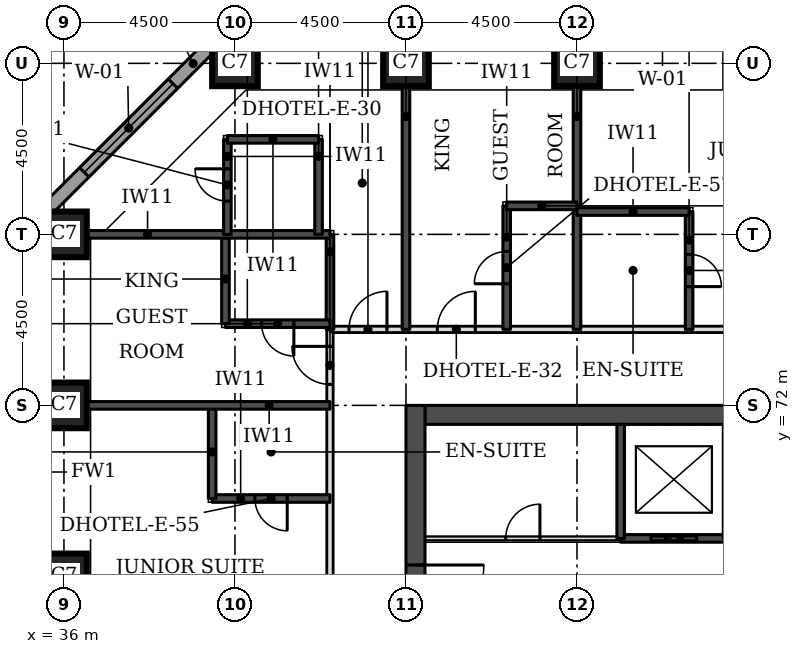
"""IFC4 building model, lengths in metres.
Left out: names, types, materials, properties, quantities, classifications, styles, units other than length and angle.
Written with IfcOpenShell. Run it as: python <this file> out.ifc"""

import sys

from ifc_helpers import new_model, si_unit, direction, frame, frame_2d, origin, origin_2d, place, context, subcontext, project, spatial, rectangle, extrude, element, fill, save


model = new_model("IFC4")
c1 = context("Model", 3, precision=1e-05, world=origin(), true_north=direction((0.0, 1.0)))
c2 = subcontext(c1, "Body", "Model", "MODEL_VIEW")
j1 = project(units=[si_unit("LENGTHUNIT", "METRE"), si_unit("PLANEANGLEUNIT", "RADIAN")], contexts=[c1])
p1 = place(None, origin())
s1 = spatial("IfcSite", under=j1, at=p1, CompositionType="ELEMENT")
p2 = place(p1, origin())
s2 = spatial("IfcBuilding", under=s1, at=p2, CompositionType="ELEMENT")
p3 = place(p2, frame((0.0, 0.0, 62.7)))
s3 = spatial("IfcBuildingStorey", under=s2, at=p3, CompositionType="ELEMENT", Elevation=62.7)
for number, where, z_axis, x_axis in (
    (1, (36.0, 67.5, 0.0), (0.0, 0.0, 1.0), (1.0, 0.0, 0.0)),
    (2, (36.0, 72.0, 0.0), (0.0, 0.0, 1.0), (1.0, 0.0, 0.0)),
    (3, (36.0, 76.5, 0.0), (0.0, 0.0, 1.0), (1.0, 0.0, 0.0)),
    (4, (40.5, 81.0, 0.0), (0.0, 0.0, 1.0), (1.0, 0.0, 0.0)),
    (5, (45.0, 81.0, 0.0), (0.0, 0.0, 1.0), (1.0, 0.0, 0.0)),
    (6, (49.5, 81.0, 0.0), (0.0, 0.0, 1.0), (1.0, 0.0, 0.0)),
):
    element("IfcColumn", number, at=place(p3, frame(where, z_axis=z_axis, x_axis=x_axis)), inside=s3, PredefinedType="COLUMN", context=c2, shape_type="SweptSolid", body=[
        extrude(rectangle(XDim=1.2, YDim=1.2, at=origin_2d()), origin(), (0.0, 0.0, 1.0), 3.3),
    ])
p4 = place(p3, frame((45.5, 71.75, 0.0), z_axis=(0.0, 0.0, 1.0), x_axis=(1.0, 0.0, 0.0)))
e7 = element("IfcWall", 7, at=p4, inside=s3, PredefinedType="SHEAR", context=c2, shape_type="SweptSolid", body=[
    extrude(rectangle(XDim=21.5, YDim=0.5, at=frame_2d((10.75, 0.0))), origin(), (0.0, 0.0, 1.0), 3.3),
])
p5 = place(p3, frame((45.25, 49.5, 0.0), z_axis=(0.0, 0.0, 1.0), x_axis=(0.0, 1.0, 0.0)))
e8 = element("IfcWall", 8, at=p5, inside=s3, PredefinedType="SHEAR", context=c2, shape_type="SweptSolid", body=[
    extrude(rectangle(XDim=22.5, YDim=0.5, at=frame_2d((11.25, 0.0))), origin(), (0.0, 0.0, 1.0), 3.3),
])
p6 = place(p5, frame((4.2, 0.0, 0.0)))
e9 = element("IfcOpeningElement", 9, at=p6, cuts=e8, PredefinedType="OPENING", context=c2, shape_type="SweptSolid", body=[
    extrude(rectangle(XDim=1.8, YDim=2.1, at=frame_2d((0.9, 1.05))), frame((0.0, 0.26, 0.0), z_axis=(0.0, -1.0, 0.0), x_axis=(1.0, 0.0, 0.0)), (0.0, 0.0, 1.0), 0.52),
])
p7 = place(p5, frame((6.9, 0.0, 0.0)))
e10 = element("IfcOpeningElement", 10, at=p7, cuts=e8, PredefinedType="OPENING", context=c2, shape_type="SweptSolid", body=[
    extrude(rectangle(XDim=1.1, YDim=2.1, at=frame_2d((0.55, 1.05))), frame((0.0, 0.26, 0.0), z_axis=(0.0, -1.0, 0.0), x_axis=(1.0, 0.0, 0.0)), (0.0, 0.0, 1.0), 0.52),
])
p8 = place(p5, frame((13.6, 0.0, 0.0)))
e11 = element("IfcOpeningElement", 11, at=p8, cuts=e8, PredefinedType="OPENING", context=c2, shape_type="SweptSolid", body=[
    extrude(rectangle(XDim=1.1, YDim=2.1, at=frame_2d((0.55, 1.05))), frame((0.0, 0.26, 0.0), z_axis=(0.0, -1.0, 0.0), x_axis=(1.0, 0.0, 0.0)), (0.0, 0.0, 1.0), 0.52),
])
p9 = place(p5, frame((16.5, 0.0, 0.0)))
e12 = element("IfcOpeningElement", 12, at=p9, cuts=e8, PredefinedType="OPENING", context=c2, shape_type="SweptSolid", body=[
    extrude(rectangle(XDim=1.8, YDim=2.1, at=frame_2d((0.9, 1.05))), frame((0.0, 0.26, 0.0), z_axis=(0.0, -1.0, 0.0), x_axis=(1.0, 0.0, 0.0)), (0.0, 0.0, 1.0), 0.52),
])
p10 = place(p3, frame((40.23, 81.826, 0.0), z_axis=(0.0, 0.0, 1.0), x_axis=(-0.707106781187, -0.707106781187, 0.0)))
e13 = element("IfcWall", 13, at=p10, inside=s3, PredefinedType="STANDARD", context=c2, shape_type="SweptSolid", body=[
    extrude(rectangle(XDim=7.151, YDim=0.35, at=frame_2d((3.576, 0.0))), origin(), (0.0, 0.0, 1.0), 3.055),
])
p11 = place(p10, frame((1.926, 0.0, 0.8)))
e14 = element("IfcOpeningElement", 14, at=p11, cuts=e13, PredefinedType="OPENING", context=c2, shape_type="SweptSolid", body=[
    extrude(rectangle(XDim=3.3, YDim=1.5, at=frame_2d((1.65, 0.75))), frame((0.0, 0.185, 0.0), z_axis=(0.0, -1.0, 0.0), x_axis=(1.0, 0.0, 0.0)), (0.0, 0.0, 1.0), 0.37),
])
p12 = place(p3, frame((43.0, 57.35, 0.0), z_axis=(0.0, 0.0, 1.0), x_axis=(0.0, 1.0, 0.0)))
e15 = element("IfcWall", 15, at=p12, inside=s3, PredefinedType="PARTITIONING", context=c2, shape_type="SweptSolid", body=[
    extrude(rectangle(XDim=16.65, YDim=0.15, at=frame_2d((8.325, 0.0))), origin(), (0.0, 0.0, 1.0), 3.08),
])
p13 = place(p12, frame((8.425, 0.0, 0.0)))
e16 = element("IfcOpeningElement", 16, at=p13, cuts=e15, PredefinedType="OPENING", context=c2, shape_type="SweptSolid", body=[
    extrude(rectangle(XDim=1.0, YDim=2.1, at=frame_2d((0.5, 1.05))), frame((0.0, 0.085, 0.0), z_axis=(0.0, -1.0, 0.0), x_axis=(1.0, 0.0, 0.0)), (0.0, 0.0, 1.0), 0.17),
])
p14 = place(p12, frame((15.203, 0.0, 0.0)))
e17 = element("IfcOpeningElement", 17, at=p14, cuts=e15, PredefinedType="OPENING", context=c2, shape_type="SweptSolid", body=[
    extrude(rectangle(XDim=1.0, YDim=2.1, at=frame_2d((0.5, 1.05))), frame((0.0, 0.085, 0.0), z_axis=(0.0, -1.0, 0.0), x_axis=(1.0, 0.0, 0.0)), (0.0, 0.0, 1.0), 0.17),
])
p15 = place(p3, frame((43.0, 74.0, 0.0), z_axis=(0.0, 0.0, 1.0), x_axis=(1.0, 0.0, 0.0)))
e18 = element("IfcWall", 18, at=p15, inside=s3, PredefinedType="PARTITIONING", context=c2, shape_type="SweptSolid", body=[
    extrude(rectangle(XDim=26.5, YDim=0.15, at=frame_2d((13.25, 0.0))), origin(), (0.0, 0.0, 1.0), 3.08),
])
p16 = place(p15, frame((2.825, 0.0, 0.0)))
e19 = element("IfcOpeningElement", 19, at=p16, cuts=e18, PredefinedType="OPENING", context=c2, shape_type="SweptSolid", body=[
    extrude(rectangle(XDim=1.0, YDim=2.1, at=frame_2d((0.5, 1.05))), frame((0.0, 0.085, 0.0), z_axis=(0.0, -1.0, 0.0), x_axis=(1.0, 0.0, 0.0)), (0.0, 0.0, 1.0), 0.17),
])
p17 = place(p15, frame((11.975, 0.0, 0.0)))
e20 = element("IfcOpeningElement", 20, at=p17, cuts=e18, PredefinedType="OPENING", context=c2, shape_type="SweptSolid", body=[
    extrude(rectangle(XDim=1.0, YDim=2.1, at=frame_2d((0.5, 1.05))), frame((0.0, 0.085, 0.0), z_axis=(0.0, -1.0, 0.0), x_axis=(1.0, 0.0, 0.0)), (0.0, 0.0, 1.0), 0.17),
])
p18 = place(p15, frame((18.275, 0.0, 0.0)))
e21 = element("IfcOpeningElement", 21, at=p18, cuts=e18, PredefinedType="OPENING", context=c2, shape_type="SweptSolid", body=[
    extrude(rectangle(XDim=1.0, YDim=2.1, at=frame_2d((0.5, 1.05))), frame((0.0, 0.085, 0.0), z_axis=(0.0, -1.0, 0.0), x_axis=(1.0, 0.0, 0.0)), (0.0, 0.0, 1.0), 0.17),
])
p19 = place(p15, frame((0.5, 0.0, 0.0)))
e22 = element("IfcOpeningElement", 22, at=p19, cuts=e18, PredefinedType="OPENING", context=c2, shape_type="SweptSolid", body=[
    extrude(rectangle(XDim=1.0, YDim=2.1, at=frame_2d((0.5, 1.05))), frame((0.0, 0.085, 0.0), z_axis=(0.0, -1.0, 0.0), x_axis=(1.0, 0.0, 0.0)), (0.0, 0.0, 1.0), 0.17),
])
p20 = place(p15, frame((25.0, 0.0, 0.0)))
e23 = element("IfcOpeningElement", 23, at=p20, cuts=e18, PredefinedType="OPENING", context=c2, shape_type="SweptSolid", body=[
    extrude(rectangle(XDim=1.0, YDim=2.1, at=frame_2d((0.5, 1.05))), frame((0.0, 0.085, 0.0), z_axis=(0.0, -1.0, 0.0), x_axis=(1.0, 0.0, 0.0)), (0.0, 0.0, 1.0), 0.17),
])
p21 = place(p3, frame((39.9, 69.55, 0.0), z_axis=(0.0, 0.0, 1.0), x_axis=(1.0, 0.0, 0.0)))
e24 = element("IfcWall", 24, at=p21, inside=s3, PredefinedType="SOLIDWALL", context=c2, shape_type="SweptSolid", body=[
    extrude(rectangle(XDim=3.1, YDim=0.2, at=frame_2d((1.55, 0.0))), origin(), (0.0, 0.0, 1.0), 3.08),
])
p22 = place(p21, frame((1.125, 0.0, 0.0)))
e25 = element("IfcOpeningElement", 25, at=p22, cuts=e24, PredefinedType="OPENING", context=c2, shape_type="SweptSolid", body=[
    extrude(rectangle(XDim=0.85, YDim=2.1, at=frame_2d((0.425, 1.05))), frame((0.0, 0.11, 0.0), z_axis=(0.0, -1.0, 0.0), x_axis=(1.0, 0.0, 0.0)), (0.0, 0.0, 1.0), 0.22),
])
p23 = place(p3, frame((39.9, 69.55, 0.0), z_axis=(0.0, 0.0, 1.0), x_axis=(0.0, 1.0, 0.0)))
e26 = element("IfcWall", 26, at=p23, inside=s3, PredefinedType="SOLIDWALL", context=c2, shape_type="SweptSolid", body=[
    extrude(rectangle(XDim=2.45, YDim=0.2, at=frame_2d((1.225, 0.0))), origin(), (0.0, 0.0, 1.0), 3.08),
])
p24 = place(p3, frame((36.6, 72.0, 0.0), z_axis=(0.0, 0.0, 1.0), x_axis=(1.0, 0.0, 0.0)))
e27 = element("IfcWall", 27, at=p24, inside=s3, PredefinedType="SOLIDWALL", context=c2, shape_type="SweptSolid", body=[
    extrude(rectangle(XDim=6.4, YDim=0.2, at=frame_2d((3.2, 0.0))), origin(), (0.0, 0.0, 1.0), 3.08),
])
p25 = place(p3, frame((43.0, 74.0, 0.0), z_axis=(0.0, 0.0, 1.0), x_axis=(0.0, 1.0, 0.0)))
e28 = element("IfcWall", 28, at=p25, inside=s3, PredefinedType="SOLIDWALL", context=c2, shape_type="SweptSolid", body=[
    extrude(rectangle(XDim=2.5, YDim=0.2, at=frame_2d((1.25, 0.0))), origin(), (0.0, 0.0, 1.0), 3.08),
])
p26 = place(p3, frame((45.0, 74.0, 0.0), z_axis=(0.0, 0.0, 1.0), x_axis=(0.0, 1.0, 0.0)))
e29 = element("IfcWall", 29, at=p26, inside=s3, PredefinedType="SOLIDWALL", context=c2, shape_type="SweptSolid", body=[
    extrude(rectangle(XDim=6.4, YDim=0.2, at=frame_2d((3.2, 0.0))), origin(), (0.0, 0.0, 1.0), 3.08),
])
p27 = place(p3, frame((47.65, 74.0, 0.0), z_axis=(0.0, 0.0, 1.0), x_axis=(0.0, 1.0, 0.0)))
e30 = element("IfcWall", 30, at=p27, inside=s3, PredefinedType="SOLIDWALL", context=c2, shape_type="SweptSolid", body=[
    extrude(rectangle(XDim=3.25, YDim=0.2, at=frame_2d((1.625, 0.0))), origin(), (0.0, 0.0, 1.0), 3.08),
])
p28 = place(p27, frame((1.2, 0.0, 0.0)))
e31 = element("IfcOpeningElement", 31, at=p28, cuts=e30, PredefinedType="OPENING", context=c2, shape_type="SweptSolid", body=[
    extrude(rectangle(XDim=0.85, YDim=2.1, at=frame_2d((0.425, 1.05))), frame((0.0, 0.11, 0.0), z_axis=(0.0, -1.0, 0.0), x_axis=(1.0, 0.0, 0.0)), (0.0, 0.0, 1.0), 0.22),
])
p29 = place(p3, frame((49.5, 74.0, 0.0), z_axis=(0.0, 0.0, 1.0), x_axis=(0.0, 1.0, 0.0)))
e32 = element("IfcWall", 32, at=p29, inside=s3, PredefinedType="SOLIDWALL", context=c2, shape_type="SweptSolid", body=[
    extrude(rectangle(XDim=6.4, YDim=0.2, at=frame_2d((3.2, 0.0))), origin(), (0.0, 0.0, 1.0), 3.08),
])
p30 = place(p3, frame((52.45, 74.0, 0.0), z_axis=(0.0, 0.0, 1.0), x_axis=(0.0, 1.0, 0.0)))
e33 = element("IfcWall", 33, at=p30, inside=s3, PredefinedType="SOLIDWALL", context=c2, shape_type="SweptSolid", body=[
    extrude(rectangle(XDim=3.1, YDim=0.2, at=frame_2d((1.55, 0.0))), origin(), (0.0, 0.0, 1.0), 3.08),
])
p31 = place(p30, frame((1.125, 0.0, 0.0)))
e34 = element("IfcOpeningElement", 34, at=p31, cuts=e33, PredefinedType="OPENING", context=c2, shape_type="SweptSolid", body=[
    extrude(rectangle(XDim=0.85, YDim=2.1, at=frame_2d((0.425, 1.05))), frame((0.0, 0.11, 0.0), z_axis=(0.0, -1.0, 0.0), x_axis=(1.0, 0.0, 0.0)), (0.0, 0.0, 1.0), 0.22),
])
p32 = place(p3, frame((40.25, 74.15, 0.0), z_axis=(0.0, 0.0, 1.0), x_axis=(1.0, 0.0, 0.0)))
e35 = element("IfcWall", 35, at=p32, inside=s3, PredefinedType="SOLIDWALL", context=c2, shape_type="SweptSolid", body=[
    extrude(rectangle(XDim=2.75, YDim=0.2, at=frame_2d((1.375, 0.0))), origin(), (0.0, 0.0, 1.0), 3.08),
])
p33 = place(p32, frame((0.95, 0.0, 0.0)))
e36 = element("IfcOpeningElement", 36, at=p33, cuts=e35, PredefinedType="OPENING", context=c2, shape_type="SweptSolid", body=[
    extrude(rectangle(XDim=0.85, YDim=2.1, at=frame_2d((0.425, 1.05))), frame((0.0, 0.11, 0.0), z_axis=(0.0, -1.0, 0.0), x_axis=(1.0, 0.0, 0.0)), (0.0, 0.0, 1.0), 0.22),
])
p34 = place(p3, frame((40.25, 74.15, 0.0), z_axis=(0.0, 0.0, 1.0), x_axis=(0.0, 1.0, 0.0)))
e37 = element("IfcWall", 37, at=p34, inside=s3, PredefinedType="SOLIDWALL", context=c2, shape_type="SweptSolid", body=[
    extrude(rectangle(XDim=2.35, YDim=0.2, at=frame_2d((1.175, 0.0))), origin(), (0.0, 0.0, 1.0), 3.08),
])
p35 = place(p3, frame((36.6, 76.5, 0.0), z_axis=(0.0, 0.0, 1.0), x_axis=(1.0, 0.0, 0.0)))
e38 = element("IfcWall", 38, at=p35, inside=s3, PredefinedType="SOLIDWALL", context=c2, shape_type="SweptSolid", body=[
    extrude(rectangle(XDim=6.4, YDim=0.2, at=frame_2d((3.2, 0.0))), origin(), (0.0, 0.0, 1.0), 3.08),
])
p36 = place(p3, frame((40.3, 76.5, 0.0), z_axis=(0.0, 0.0, 1.0), x_axis=(0.0, 1.0, 0.0)))
e39 = element("IfcWall", 39, at=p36, inside=s3, PredefinedType="SOLIDWALL", context=c2, shape_type="SweptSolid", body=[
    extrude(rectangle(XDim=2.5, YDim=0.2, at=frame_2d((1.25, 0.0))), origin(), (0.0, 0.0, 1.0), 3.08),
])
p37 = place(p36, frame((0.875, 0.0, 0.0)))
e40 = element("IfcOpeningElement", 40, at=p37, cuts=e39, PredefinedType="OPENING", context=c2, shape_type="SweptSolid", body=[
    extrude(rectangle(XDim=0.85, YDim=2.1, at=frame_2d((0.425, 1.05))), frame((0.0, 0.11, 0.0), z_axis=(0.0, -1.0, 0.0), x_axis=(1.0, 0.0, 0.0)), (0.0, 0.0, 1.0), 0.22),
])
p38 = place(p3, frame((42.7, 76.5, 0.0), z_axis=(0.0, 0.0, 1.0), x_axis=(0.0, 1.0, 0.0)))
e41 = element("IfcWall", 41, at=p38, inside=s3, PredefinedType="SOLIDWALL", context=c2, shape_type="SweptSolid", body=[
    extrude(rectangle(XDim=2.5, YDim=0.2, at=frame_2d((1.25, 0.0))), origin(), (0.0, 0.0, 1.0), 3.08),
])
p39 = place(p3, frame((49.5, 77.1, 0.0), z_axis=(0.0, 0.0, 1.0), x_axis=(1.0, 0.0, 0.0)))
e42 = element("IfcWall", 42, at=p39, inside=s3, PredefinedType="SOLIDWALL", context=c2, shape_type="SweptSolid", body=[
    extrude(rectangle(XDim=2.95, YDim=0.2, at=frame_2d((1.475, 0.0))), origin(), (0.0, 0.0, 1.0), 3.08),
])
p40 = place(p3, frame((47.65, 77.25, 0.0), z_axis=(0.0, 0.0, 1.0), x_axis=(1.0, 0.0, 0.0)))
e43 = element("IfcWall", 43, at=p40, inside=s3, PredefinedType="SOLIDWALL", context=c2, shape_type="SweptSolid", body=[
    extrude(rectangle(XDim=1.85, YDim=0.2, at=frame_2d((0.925, 0.0))), origin(), (0.0, 0.0, 1.0), 3.08),
])
p41 = place(p3, frame((40.3, 79.0, 0.0), z_axis=(0.0, 0.0, 1.0), x_axis=(1.0, 0.0, 0.0)))
e44 = element("IfcWall", 44, at=p41, inside=s3, PredefinedType="SOLIDWALL", context=c2, shape_type="SweptSolid", body=[
    extrude(rectangle(XDim=2.4, YDim=0.2, at=frame_2d((1.2, 0.0))), origin(), (0.0, 0.0, 1.0), 3.08),
])
p42 = place(p3, frame((45.5, 68.5, 0.0), z_axis=(0.0, 0.0, 1.0), x_axis=(1.0, 0.0, 0.0)))
e45 = element("IfcWall", 45, at=p42, inside=s3, PredefinedType="PARTITIONING", context=c2, shape_type="SweptSolid", body=[
    extrude(rectangle(XDim=5.15, YDim=0.1, at=frame_2d((2.575, 0.0))), origin(), (0.0, 0.0, 1.0), 3.08),
])
p43 = place(p42, frame((2.125, 0.0, 0.0)))
e46 = element("IfcOpeningElement", 46, at=p43, cuts=e45, PredefinedType="OPENING", context=c2, shape_type="SweptSolid", body=[
    extrude(rectangle(XDim=0.9, YDim=2.1, at=frame_2d((0.45, 1.05))), frame((0.0, 0.06, 0.0), z_axis=(0.0, -1.0, 0.0), x_axis=(1.0, 0.0, 0.0)), (0.0, 0.0, 1.0), 0.12),
])
p44 = place(p3, frame((50.65, 68.5, 0.0), z_axis=(0.0, 0.0, 1.0), x_axis=(1.0, 0.0, 0.0)))
e47 = element("IfcWall", 47, at=p44, inside=s3, PredefinedType="SOLIDWALL", context=c2, shape_type="SweptSolid", body=[
    extrude(rectangle(XDim=11.2, YDim=0.2, at=frame_2d((5.6, 0.0))), origin(), (0.0, 0.0, 1.0), 3.08),
])
p45 = place(p44, frame((0.8, 0.0, 0.0)))
e48 = element("IfcOpeningElement", 48, at=p45, cuts=e47, PredefinedType="OPENING", context=c2, shape_type="SweptSolid", body=[
    extrude(rectangle(XDim=1.2, YDim=2.1, at=frame_2d((0.6, 1.05))), frame((0.0, 0.11, 0.0), z_axis=(0.0, -1.0, 0.0), x_axis=(1.0, 0.0, 0.0)), (0.0, 0.0, 1.0), 0.22),
])
p46 = place(p44, frame((3.6, 0.0, 0.0)))
e49 = element("IfcOpeningElement", 49, at=p46, cuts=e47, PredefinedType="OPENING", context=c2, shape_type="SweptSolid", body=[
    extrude(rectangle(XDim=1.2, YDim=2.1, at=frame_2d((0.6, 1.05))), frame((0.0, 0.11, 0.0), z_axis=(0.0, -1.0, 0.0), x_axis=(1.0, 0.0, 0.0)), (0.0, 0.0, 1.0), 0.22),
])
p47 = place(p44, frame((6.4, 0.0, 0.0)))
e50 = element("IfcOpeningElement", 50, at=p47, cuts=e47, PredefinedType="OPENING", context=c2, shape_type="SweptSolid", body=[
    extrude(rectangle(XDim=1.2, YDim=2.1, at=frame_2d((0.6, 1.05))), frame((0.0, 0.11, 0.0), z_axis=(0.0, -1.0, 0.0), x_axis=(1.0, 0.0, 0.0)), (0.0, 0.0, 1.0), 0.22),
])
p48 = place(p44, frame((9.2, 0.0, 0.0)))
e51 = element("IfcOpeningElement", 51, at=p48, cuts=e47, PredefinedType="OPENING", context=c2, shape_type="SweptSolid", body=[
    extrude(rectangle(XDim=1.2, YDim=2.1, at=frame_2d((0.6, 1.05))), frame((0.0, 0.11, 0.0), z_axis=(0.0, -1.0, 0.0), x_axis=(1.0, 0.0, 0.0)), (0.0, 0.0, 1.0), 0.22),
])
for number, where, z_axis, x_axis in (
    (52, (50.65, 68.5, 0.0), (0.0, 0.0, 1.0), (0.0, 1.0, 0.0)),
    (53, (53.45, 68.5, 0.0), (0.0, 0.0, 1.0), (0.0, 1.0, 0.0)),
):
    element("IfcWall", number, at=place(p3, frame(where, z_axis=z_axis, x_axis=x_axis)), inside=s3, PredefinedType="SOLIDWALL", context=c2, shape_type="SweptSolid", body=[
        extrude(rectangle(XDim=3.0, YDim=0.2, at=frame_2d((1.5, 0.0))), origin(), (0.0, 0.0, 1.0), 3.08),
    ])
p49 = place(p11, origin())
e54 = element("IfcWindow", 54, at=p49, inside=s3, PartitioningType="SINGLE_PANEL", PredefinedType="WINDOW", context=c2, shape_type="SweptSolid", body=[
    extrude(rectangle(XDim=3.3, YDim=1.5, at=frame_2d((1.65, 0.75))), frame((0.0, 0.085, 0.0), z_axis=(0.0, -1.0, 0.0), x_axis=(1.0, 0.0, 0.0)), (0.0, 0.0, 1.0), 0.06),
])
fill(e14, e54)
p50 = place(p22, frame((0.85, 0.0, 0.0), z_axis=(0.0, 0.0, 1.0), x_axis=(-1.0, 0.0, 0.0)))
e55 = element("IfcDoor", 55, at=p50, inside=s3, OperationType="SINGLE_SWING_LEFT", PredefinedType="DOOR", context=c2, shape_type="SweptSolid", body=[
    extrude(rectangle(XDim=0.85, YDim=2.1, at=frame_2d((0.425, 1.05))), frame((0.0, 0.025, 0.0), z_axis=(0.0, -1.0, 0.0), x_axis=(1.0, 0.0, 0.0)), (0.0, 0.0, 1.0), 0.05),
])
fill(e25, e55)
p51 = place(p14, origin())
e56 = element("IfcDoor", 56, at=p51, inside=s3, OperationType="SINGLE_SWING_RIGHT", PredefinedType="DOOR", context=c2, shape_type="SweptSolid", body=[
    extrude(rectangle(XDim=1.0, YDim=2.1, at=frame_2d((0.5, 1.05))), frame((0.0, 0.025, 0.0), z_axis=(0.0, -1.0, 0.0), x_axis=(1.0, 0.0, 0.0)), (0.0, 0.0, 1.0), 0.05),
])
fill(e17, e56)
p52 = place(p33, frame((0.85, 0.0, 0.0), z_axis=(0.0, 0.0, 1.0), x_axis=(-1.0, 0.0, 0.0)))
e57 = element("IfcDoor", 57, at=p52, inside=s3, OperationType="SINGLE_SWING_LEFT", PredefinedType="DOOR", context=c2, shape_type="SweptSolid", body=[
    extrude(rectangle(XDim=0.85, YDim=2.1, at=frame_2d((0.425, 1.05))), frame((0.0, 0.025, 0.0), z_axis=(0.0, -1.0, 0.0), x_axis=(1.0, 0.0, 0.0)), (0.0, 0.0, 1.0), 0.05),
])
fill(e36, e57)
p53 = place(p16, origin())
e58 = element("IfcDoor", 58, at=p53, inside=s3, OperationType="SINGLE_SWING_RIGHT", PredefinedType="DOOR", context=c2, shape_type="SweptSolid", body=[
    extrude(rectangle(XDim=1.0, YDim=2.1, at=frame_2d((0.5, 1.05))), frame((0.0, 0.025, 0.0), z_axis=(0.0, -1.0, 0.0), x_axis=(1.0, 0.0, 0.0)), (0.0, 0.0, 1.0), 0.05),
])
fill(e19, e58)
p54 = place(p28, origin())
e59 = element("IfcDoor", 59, at=p54, inside=s3, OperationType="SINGLE_SWING_LEFT", PredefinedType="DOOR", context=c2, shape_type="SweptSolid", body=[
    extrude(rectangle(XDim=0.85, YDim=2.1, at=frame_2d((0.425, 1.05))), frame((0.0, 0.025, 0.0), z_axis=(0.0, -1.0, 0.0), x_axis=(1.0, 0.0, 0.0)), (0.0, 0.0, 1.0), 0.05),
])
fill(e31, e59)
p55 = place(p31, frame((0.85, 0.0, 0.0), z_axis=(0.0, 0.0, 1.0), x_axis=(-1.0, 0.0, 0.0)))
e60 = element("IfcDoor", 60, at=p55, inside=s3, OperationType="SINGLE_SWING_RIGHT", PredefinedType="DOOR", context=c2, shape_type="SweptSolid", body=[
    extrude(rectangle(XDim=0.85, YDim=2.1, at=frame_2d((0.425, 1.05))), frame((0.0, 0.025, 0.0), z_axis=(0.0, -1.0, 0.0), x_axis=(1.0, 0.0, 0.0)), (0.0, 0.0, 1.0), 0.05),
])
fill(e34, e60)
p56 = place(p19, origin())
e61 = element("IfcDoor", 61, at=p56, inside=s3, OperationType="SINGLE_SWING_RIGHT", PredefinedType="DOOR", context=c2, shape_type="SweptSolid", body=[
    extrude(rectangle(XDim=1.0, YDim=2.1, at=frame_2d((0.5, 1.05))), frame((0.0, 0.025, 0.0), z_axis=(0.0, -1.0, 0.0), x_axis=(1.0, 0.0, 0.0)), (0.0, 0.0, 1.0), 0.05),
])
fill(e22, e61)
p57 = place(p37, origin())
e62 = element("IfcDoor", 62, at=p57, inside=s3, OperationType="SINGLE_SWING_RIGHT", PredefinedType="DOOR", context=c2, shape_type="SweptSolid", body=[
    extrude(rectangle(XDim=0.85, YDim=2.1, at=frame_2d((0.425, 1.05))), frame((0.0, 0.025, 0.0), z_axis=(0.0, -1.0, 0.0), x_axis=(1.0, 0.0, 0.0)), (0.0, 0.0, 1.0), 0.05),
])
fill(e40, e62)
p58 = place(p45, origin())
e63 = element("IfcDoor", 63, at=p58, inside=s3, OperationType="DOUBLE_DOOR_SLIDING", PredefinedType="DOOR", context=c2, shape_type="SweptSolid", body=[
    extrude(rectangle(XDim=1.2, YDim=2.1, at=frame_2d((0.6, 1.05))), frame((0.0, 0.025, 0.0), z_axis=(0.0, -1.0, 0.0), x_axis=(1.0, 0.0, 0.0)), (0.0, 0.0, 1.0), 0.05),
])
fill(e48, e63)
p59 = place(p9, frame((1.8, 0.0, 0.0), z_axis=(0.0, 0.0, 1.0), x_axis=(-1.0, 0.0, 0.0)))
e64 = element("IfcDoor", 64, at=p59, inside=s3, OperationType="SINGLE_SWING_LEFT", PredefinedType="DOOR", context=c2, shape_type="SweptSolid", body=[
    extrude(rectangle(XDim=1.8, YDim=2.1, at=frame_2d((0.9, 1.05))), frame((0.0, 0.025, 0.0), z_axis=(0.0, -1.0, 0.0), x_axis=(1.0, 0.0, 0.0)), (0.0, 0.0, 1.0), 0.05),
])
fill(e12, e64)
p60 = place(p43, origin())
e65 = element("IfcDoor", 65, at=p60, inside=s3, OperationType="SINGLE_SWING_RIGHT", PredefinedType="DOOR", context=c2, shape_type="SweptSolid", body=[
    extrude(rectangle(XDim=0.9, YDim=2.1, at=frame_2d((0.45, 1.05))), frame((0.0, 0.025, 0.0), z_axis=(0.0, -1.0, 0.0), x_axis=(1.0, 0.0, 0.0)), (0.0, 0.0, 1.0), 0.05),
])
fill(e46, e65)
save(model, sys.argv[1])
